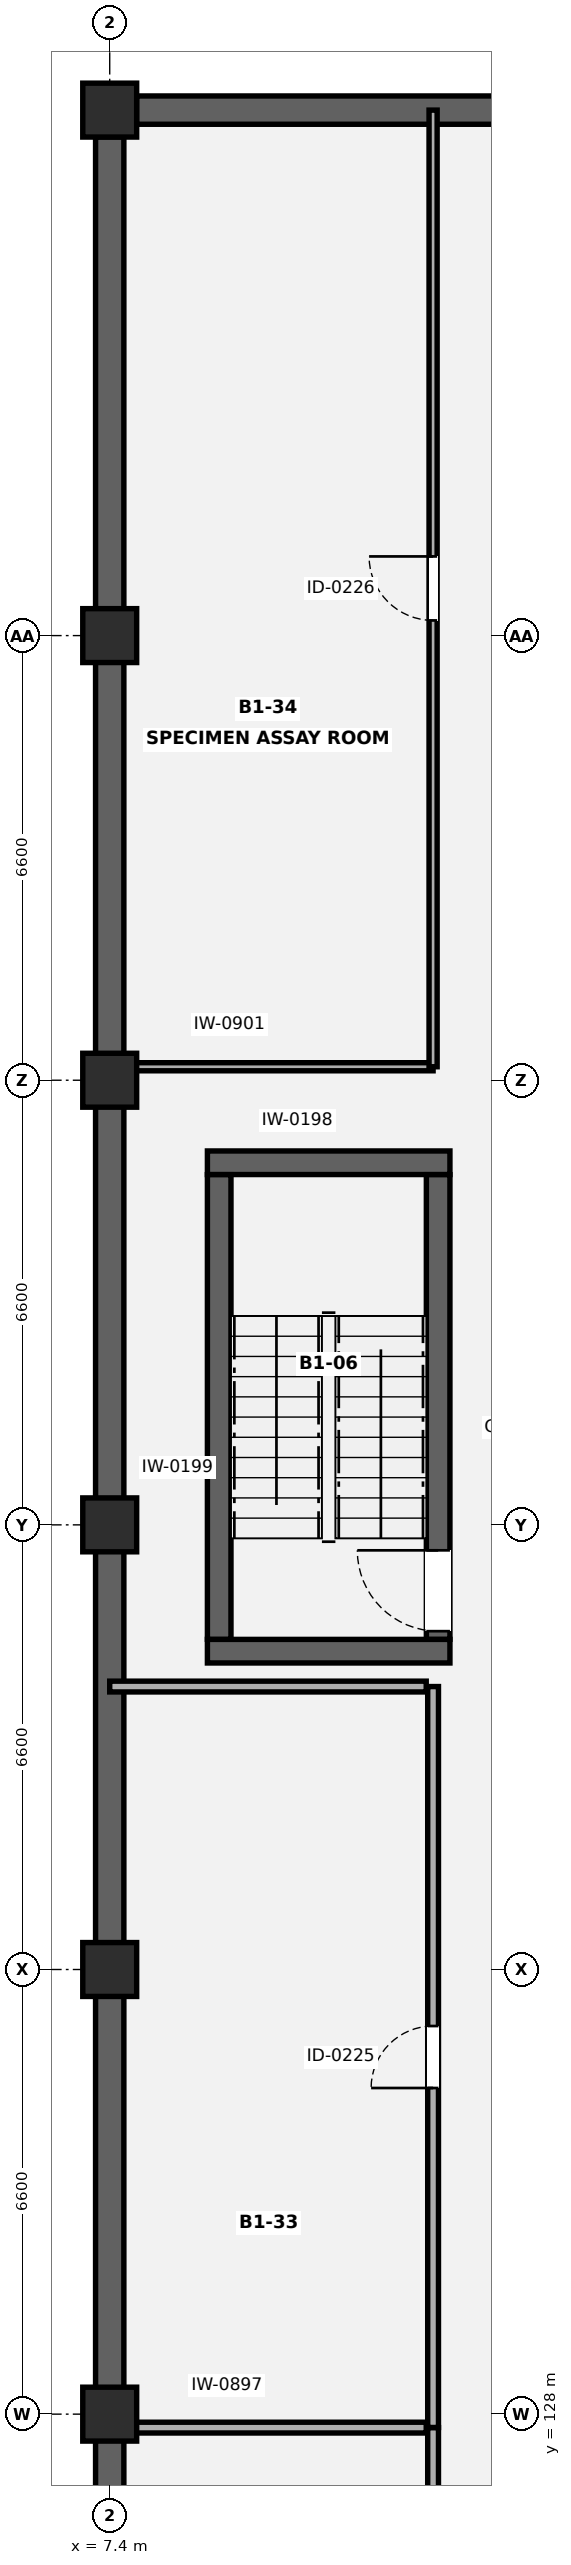
"""IFC4 building model, lengths in metres.
Left out: names, types, materials, properties, quantities, classifications, styles, units other than length and angle.
Written with IfcOpenShell. Run it as: python <this file> out.ifc"""

import sys

from ifc_helpers import new_model, si_unit, direction, frame, frame_2d, origin, origin_2d, place, context, subcontext, project, spatial, rectangle, extrude, element, fill, save


model = new_model("IFC4")
c1 = context("Model", 3, precision=1e-05, world=origin(), true_north=direction((0.0, 1.0)))
c2 = subcontext(c1, "Body", "Model", "MODEL_VIEW")
j1 = project(units=[si_unit("LENGTHUNIT", "METRE"), si_unit("PLANEANGLEUNIT", "RADIAN")], contexts=[c1])
p1 = place(None, origin())
s1 = spatial("IfcSite", under=j1, at=p1, CompositionType="ELEMENT")
p2 = place(p1, origin())
s2 = spatial("IfcBuilding", under=s1, at=p2, CompositionType="ELEMENT")
p3 = place(p2, frame((0.0, 0.0, -4.2)))
s3 = spatial("IfcBuildingStorey", under=s2, at=p3, CompositionType="ELEMENT", Elevation=-4.2)
for number, where, z_axis, x_axis in (
    (1, (7.4, 128.0, 0.0), (0.0, 0.0, 1.0), (1.0, 0.0, 0.0)),
    (2, (7.4, 134.6, 0.0), (0.0, 0.0, 1.0), (1.0, 0.0, 0.0)),
    (3, (7.4, 141.2, 0.0), (0.0, 0.0, 1.0), (1.0, 0.0, 0.0)),
    (4, (7.4, 147.8, 0.0), (0.0, 0.0, 1.0), (1.0, 0.0, 0.0)),
    (5, (7.4, 154.4, 0.0), (0.0, 0.0, 1.0), (1.0, 0.0, 0.0)),
    (6, (7.4, 162.2, 0.0), (0.0, 0.0, 1.0), (1.0, 0.0, 0.0)),
):
    element("IfcColumn", number, at=place(p3, frame(where, z_axis=z_axis, x_axis=x_axis)), inside=s3, PredefinedType="COLUMN", context=c2, shape_type="SweptSolid", body=[
        extrude(rectangle(XDim=0.8, YDim=0.8, at=origin_2d()), origin(), (0.0, 0.0, 1.0), 4.2),
    ])
p4 = place(p3, frame((7.4, 95.398, 0.0), z_axis=(0.0, 0.0, 1.0), x_axis=(0.0, 1.0, 0.0)))
e7 = element("IfcWall", 7, at=p4, inside=s3, PredefinedType="USERDEFINED", context=c2, shape_type="SweptSolid", body=[
    extrude(rectangle(XDim=66.404, YDim=0.42, at=frame_2d((33.202, 0.0))), origin(), (0.0, 0.0, 1.0), 3.85),
])
p5 = place(p3, frame((7.798, 162.2, 0.0), z_axis=(0.0, 0.0, 1.0), x_axis=(1.0, 0.0, 0.0)))
e8 = element("IfcWall", 8, at=p5, inside=s3, PredefinedType="USERDEFINED", context=c2, shape_type="SweptSolid", body=[
    extrude(rectangle(XDim=19.004, YDim=0.42, at=frame_2d((9.502, 0.0))), origin(), (0.0, 0.0, 1.0), 3.85),
])
for number, where, z_axis, x_axis in (
    (9, (8.85, 139.325, 0.0), (0.0, 0.0, 1.0), (1.0, 0.0, 0.0)),
    (10, (8.85, 146.575, 0.0), (0.0, 0.0, 1.0), (1.0, 0.0, 0.0)),
):
    element("IfcWall", number, at=place(p3, frame(where, z_axis=z_axis, x_axis=x_axis)), inside=s3, PredefinedType="SHEAR", context=c2, shape_type="SweptSolid", body=[
        extrude(rectangle(XDim=3.6, YDim=0.35, at=frame_2d((1.8, 0.0))), origin(), (0.0, 0.0, 1.0), 3.85),
    ])
p6 = place(p3, frame((9.025, 139.502, 0.0), z_axis=(0.0, 0.0, 1.0), x_axis=(0.0, 1.0, 0.0)))
e11 = element("IfcWall", 11, at=p6, inside=s3, PredefinedType="SHEAR", context=c2, shape_type="SweptSolid", body=[
    extrude(rectangle(XDim=6.896, YDim=0.35, at=frame_2d((3.448, 0.0))), origin(), (0.0, 0.0, 1.0), 3.85),
])
p7 = place(p3, frame((12.275, 139.502, 0.0), z_axis=(0.0, 0.0, 1.0), x_axis=(0.0, 1.0, 0.0)))
e12 = element("IfcWall", 12, at=p7, inside=s3, PredefinedType="SHEAR", context=c2, shape_type="SweptSolid", body=[
    extrude(rectangle(XDim=6.896, YDim=0.35, at=frame_2d((3.448, 0.0))), origin(), (0.0, 0.0, 1.0), 3.85),
])
p8 = place(p7, frame((0.12, 0.0, 0.0)))
e13 = element("IfcOpeningElement", 13, at=p8, cuts=e12, PredefinedType="OPENING", context=c2, shape_type="SweptSolid", body=[
    extrude(rectangle(XDim=1.2, YDim=2.15, at=frame_2d((0.6, 1.075))), frame((0.0, 0.185, 0.0), z_axis=(0.0, -1.0, 0.0), x_axis=(1.0, 0.0, 0.0)), (0.0, 0.0, 1.0), 0.37),
])
p9 = place(p3, frame((7.4, 127.8, 0.0), z_axis=(0.0, 0.0, 1.0), x_axis=(1.0, 0.0, 0.0)))
e14 = element("IfcWall", 14, at=p9, inside=s3, PredefinedType="PARTITIONING", context=c2, shape_type="SweptSolid", body=[
    extrude(rectangle(XDim=4.698, YDim=0.16, at=frame_2d((2.349, 0.0))), origin(), (0.0, 0.0, 1.0), 2.435),
])
p10 = place(p3, frame((12.2, 114.502, 0.0), z_axis=(0.0, 0.0, 1.0), x_axis=(0.0, 1.0, 0.0)))
e15 = element("IfcWall", 15, at=p10, inside=s3, PredefinedType="PARTITIONING", context=c2, shape_type="SweptSolid", body=[
    extrude(rectangle(XDim=13.298, YDim=0.16, at=frame_2d((6.649, 0.0))), origin(), (0.0, 0.0, 1.0), 3.85),
])
p11 = place(p10, frame((5.499, 0.0, 0.0)))
e16 = element("IfcOpeningElement", 16, at=p11, cuts=e15, PredefinedType="OPENING", context=c2, shape_type="SweptSolid", body=[
    extrude(rectangle(XDim=0.9, YDim=2.1, at=frame_2d((0.45, 1.05))), frame((0.0, 0.09, 0.0), z_axis=(0.0, -1.0, 0.0), x_axis=(1.0, 0.0, 0.0)), (0.0, 0.0, 1.0), 0.18),
])
p12 = place(p3, frame((7.4, 138.8, 0.0), z_axis=(0.0, 0.0, 1.0), x_axis=(1.0, 0.0, 0.0)))
e17 = element("IfcWall", 17, at=p12, inside=s3, PredefinedType="PARTITIONING", context=c2, shape_type="SweptSolid", body=[
    extrude(rectangle(XDim=4.698, YDim=0.16, at=frame_2d((2.349, 0.0))), origin(), (0.0, 0.0, 1.0), 3.85),
])
p13 = place(p3, frame((12.2, 127.802, 0.0), z_axis=(0.0, 0.0, 1.0), x_axis=(0.0, 1.0, 0.0)))
e18 = element("IfcWall", 18, at=p13, inside=s3, PredefinedType="PARTITIONING", context=c2, shape_type="SweptSolid", body=[
    extrude(rectangle(XDim=10.998, YDim=0.16, at=frame_2d((5.499, 0.0))), origin(), (0.0, 0.0, 1.0), 3.85),
])
p14 = place(p13, frame((5.039, 0.0, 0.0)))
e19 = element("IfcOpeningElement", 19, at=p14, cuts=e18, PredefinedType="OPENING", context=c2, shape_type="SweptSolid", body=[
    extrude(rectangle(XDim=0.92, YDim=2.12, at=frame_2d((0.46, 1.06))), frame((0.0, 0.09, 0.0), z_axis=(0.0, -1.0, 0.0), x_axis=(1.0, 0.0, 0.0)), (0.0, 0.0, 1.0), 0.18),
])
p15 = place(p3, frame((7.4, 148.0, 0.0), z_axis=(0.0, 0.0, 1.0), x_axis=(1.0, 0.0, 0.0)))
e20 = element("IfcWall", 20, at=p15, inside=s3, PredefinedType="PARTITIONING", context=c2, shape_type="SweptSolid", body=[
    extrude(rectangle(XDim=4.8, YDim=0.12, at=frame_2d((2.4, 0.0))), origin(), (0.0, 0.0, 1.0), 2.435),
])
p16 = place(p3, frame((12.2, 148.0, 0.0), z_axis=(0.0, 0.0, 1.0), x_axis=(0.0, 1.0, 0.0)))
e21 = element("IfcWall", 21, at=p16, inside=s3, PredefinedType="PARTITIONING", context=c2, shape_type="SweptSolid", body=[
    extrude(rectangle(XDim=14.2, YDim=0.12, at=frame_2d((7.1, 0.0))), origin(), (0.0, 0.0, 1.0), 3.85),
])
p17 = place(p16, frame((6.625, 0.0, 0.0)))
e22 = element("IfcOpeningElement", 22, at=p17, cuts=e21, PredefinedType="OPENING", context=c2, shape_type="SweptSolid", body=[
    extrude(rectangle(XDim=0.95, YDim=2.1, at=frame_2d((0.475, 1.05))), frame((0.0, 0.07, 0.0), z_axis=(0.0, -1.0, 0.0), x_axis=(1.0, 0.0, 0.0)), (0.0, 0.0, 1.0), 0.14),
])
p18 = place(p8, origin())
e23 = element("IfcDoor", 23, at=p18, inside=s3, OperationType="SINGLE_SWING_RIGHT", PredefinedType="DOOR", context=c2, shape_type="SweptSolid", body=[
    extrude(rectangle(XDim=1.2, YDim=2.15, at=frame_2d((0.6, 1.075))), frame((0.0, 0.025, 0.0), z_axis=(0.0, -1.0, 0.0), x_axis=(1.0, 0.0, 0.0)), (0.0, 0.0, 1.0), 0.05),
])
fill(e13, e23)
p19 = place(p14, origin())
e24 = element("IfcDoor", 24, at=p19, inside=s3, OperationType="SINGLE_SWING_LEFT", PredefinedType="DOOR", context=c2, shape_type="SweptSolid", body=[
    extrude(rectangle(XDim=0.92, YDim=2.12, at=frame_2d((0.46, 1.06))), frame((0.0, 0.025, 0.0), z_axis=(0.0, -1.0, 0.0), x_axis=(1.0, 0.0, 0.0)), (0.0, 0.0, 1.0), 0.05),
])
fill(e19, e24)
p20 = place(p17, origin())
e25 = element("IfcDoor", 25, at=p20, inside=s3, OperationType="SINGLE_SWING_RIGHT", PredefinedType="DOOR", context=c2, shape_type="SweptSolid", body=[
    extrude(rectangle(XDim=0.95, YDim=2.1, at=frame_2d((0.475, 1.05))), frame((0.0, 0.025, 0.0), z_axis=(0.0, -1.0, 0.0), x_axis=(1.0, 0.0, 0.0)), (0.0, 0.0, 1.0), 0.05),
])
fill(e22, e25)
save(model, sys.argv[1])
